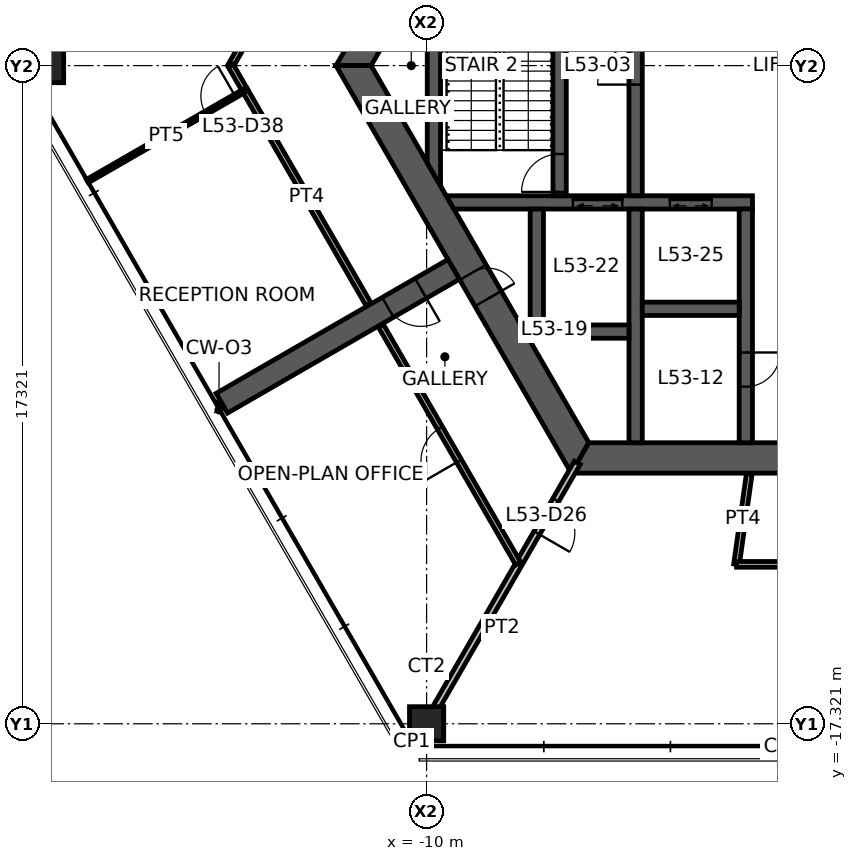
"""IFC4 building model, lengths in metres.
Left out: names, types, materials, properties, quantities, classifications, styles, units other than length and angle.
Written with IfcOpenShell. Run it as: python <this file> out.ifc"""

import sys

from ifc_helpers import new_model, si_unit, direction, frame, frame_2d, origin, origin_2d, place, context, subcontext, project, spatial, polyline, rectangle, hollow_rectangle, outline, extrude, element, fill, save


model = new_model("IFC4")
c1 = context("Model", 3, precision=1e-05, world=origin(), true_north=direction((0.0, 1.0)))
c2 = subcontext(c1, "Body", "Model", "MODEL_VIEW")
j1 = project(units=[si_unit("LENGTHUNIT", "METRE"), si_unit("PLANEANGLEUNIT", "RADIAN")], contexts=[c1])
p1 = place(None, origin())
s1 = spatial("IfcSite", under=j1, at=p1, CompositionType="ELEMENT")
p2 = place(p1, origin())
s2 = spatial("IfcBuilding", under=s1, at=p2, CompositionType="ELEMENT")
p3 = place(p2, frame((0.0, 0.0, 212.8)))
s3 = spatial("IfcBuildingStorey", under=s2, at=p3, CompositionType="ELEMENT", Elevation=212.8)
for number, where, z_axis, x_axis in (
    (1, (-20.0, 0.0, 0.0), (0.0, 0.0, 1.0), (1.0, 0.0, 0.0)),
    (2, (-10.0, -17.321, 0.0), (0.0, 0.0, 1.0), (1.0, 0.0, 0.0)),
):
    element("IfcColumn", number, at=place(p3, frame(where, z_axis=z_axis, x_axis=x_axis)), inside=s3, PredefinedType="COLUMN", context=c2, shape_type="SweptSolid", body=[
        extrude(hollow_rectangle(XDim=0.9, YDim=0.9, WallThickness=0.09, at=origin_2d()), origin(), (0.0, 0.0, 1.0), 3.9),
    ])
p4 = place(p3, frame((-5.961, 10.325, 0.0), z_axis=(0.0, 0.0, 1.0), x_axis=(-0.500004296715, -0.866022923061, 0.0)))
e3 = element("IfcWall", 3, at=p4, inside=s3, PredefinedType="SHEAR", context=c2, shape_type="SweptSolid", body=[
    extrude(outline(polyline([(-0.231, -0.4), (4.494, -0.4), (5.494, -0.4), (12.153, -0.4), (11.691, 0.4), (5.494, 0.4), (4.494, 0.4), (0.231, 0.4), (-0.231, -0.4)])), origin(), (0.0, 0.0, 1.0), 3.9),
])
p5 = place(p4, frame((4.494, 0.0, 0.0)))
e4 = element("IfcOpeningElement", 4, at=p5, cuts=e3, PredefinedType="OPENING", context=c2, shape_type="SweptSolid", body=[
    extrude(rectangle(XDim=1.0, YDim=2.1, at=frame_2d((0.5, 1.05))), frame((0.0, 0.41, 0.0), z_axis=(0.0, -1.0, 0.0), x_axis=(1.0, 0.0, 0.0)), (0.0, 0.0, 1.0), 0.82),
])
p6 = place(p3, frame((-11.922, 0.0, 0.0), z_axis=(0.0, 0.0, 1.0), x_axis=(0.500004296715, -0.866022923061, 0.0)))
e5 = element("IfcWall", 5, at=p6, inside=s3, PredefinedType="SHEAR", context=c2, shape_type="SweptSolid", body=[
    extrude(outline(polyline([(-0.231, -0.4), (6.281, -0.4), (7.081, -0.4), (12.153, -0.4), (11.691, 0.4), (7.081, 0.4), (6.281, 0.4), (0.231, 0.4), (-0.231, -0.4)])), origin(), (0.0, 0.0, 1.0), 3.9),
])
p7 = place(p6, frame((6.281, 0.0, 0.0)))
e6 = element("IfcOpeningElement", 6, at=p7, cuts=e5, PredefinedType="OPENING", context=c2, shape_type="SweptSolid", body=[
    extrude(rectangle(XDim=0.8, YDim=2.1, at=frame_2d((0.4, 1.05))), frame((0.0, 0.41, 0.0), z_axis=(0.0, -1.0, 0.0), x_axis=(1.0, 0.0, 0.0)), (0.0, 0.0, 1.0), 0.82),
])
p8 = place(p3, frame((-5.961, -10.325, 0.0), z_axis=(0.0, 0.0, 1.0), x_axis=(1.0, 0.0, 0.0)))
e7 = element("IfcWall", 7, at=p8, inside=s3, PredefinedType="SHEAR", context=c2, shape_type="SweptSolid", body=[
    extrude(outline(polyline([(-0.231, -0.4), (5.461, -0.4), (6.461, -0.4), (12.153, -0.4), (11.691, 0.4), (6.461, 0.4), (5.461, 0.4), (0.231, 0.4), (-0.231, -0.4)])), origin(), (0.0, 0.0, 1.0), 3.9),
])
p9 = place(p8, frame((5.461, 0.0, 0.0)))
e8 = element("IfcOpeningElement", 8, at=p9, cuts=e7, PredefinedType="OPENING", context=c2, shape_type="SweptSolid", body=[
    extrude(rectangle(XDim=1.0, YDim=2.1, at=frame_2d((0.5, 1.05))), frame((0.0, 0.41, 0.0), z_axis=(0.0, -1.0, 0.0), x_axis=(1.0, 0.0, 0.0)), (0.0, 0.0, 1.0), 0.82),
])
p10 = place(p3, frame((-9.288, -5.363, 0.0), z_axis=(0.0, 0.0, 1.0), x_axis=(-0.866027473358, -0.499996415376, 0.0)))
e9 = element("IfcWall", 9, at=p10, inside=s3, PredefinedType="SHEAR", context=c2, shape_type="SweptSolid", body=[
    extrude(rectangle(XDim=7.045, YDim=0.6, at=frame_2d((3.523, 0.0))), origin(), (0.0, 0.0, 1.0), 3.9),
])
p11 = place(p10, frame((1.0, 0.0, 0.0)))
e10 = element("IfcOpeningElement", 10, at=p11, cuts=e9, PredefinedType="OPENING", context=c2, shape_type="SweptSolid", body=[
    extrude(rectangle(XDim=1.0, YDim=2.1, at=frame_2d((0.5, 1.05))), frame((0.0, 0.31, 0.0), z_axis=(0.0, -1.0, 0.0), x_axis=(1.0, 0.0, 0.0)), (0.0, 0.0, 1.0), 0.62),
])
p12 = place(p3, frame((-9.382, -3.6, 0.0), z_axis=(0.0, 0.0, 1.0), x_axis=(1.0, 0.0, 0.0)))
e11 = element("IfcWall", 11, at=p12, inside=s3, PredefinedType="SHEAR", context=c2, shape_type="SweptSolid", body=[
    extrude(outline(polyline([(0.101, -0.175), (3.232, -0.175), (4.532, -0.175), (5.782, -0.175), (6.882, -0.175), (7.957, -0.175), (7.957, 0.175), (6.882, 0.175), (5.782, 0.175), (4.532, 0.175), (3.232, 0.175), (-0.101, 0.175), (0.101, -0.175)])), origin(), (0.0, 0.0, 1.0), 3.9),
])
p13 = place(p12, frame((5.782, 0.0, 0.0)))
e12 = element("IfcOpeningElement", 12, at=p13, cuts=e11, PredefinedType="OPENING", context=c2, shape_type="SweptSolid", body=[
    extrude(rectangle(XDim=1.1, YDim=2.1, at=frame_2d((0.55, 1.05))), frame((0.0, 0.185, 0.0), z_axis=(0.0, -1.0, 0.0), x_axis=(1.0, 0.0, 0.0)), (0.0, 0.0, 1.0), 0.37),
])
p14 = place(p12, frame((3.232, 0.0, 0.0)))
e13 = element("IfcOpeningElement", 13, at=p14, cuts=e11, PredefinedType="OPENING", context=c2, shape_type="SweptSolid", body=[
    extrude(rectangle(XDim=1.3, YDim=2.1, at=frame_2d((0.65, 1.05))), frame((0.0, 0.185, 0.0), z_axis=(0.0, -1.0, 0.0), x_axis=(1.0, 0.0, 0.0)), (0.0, 0.0, 1.0), 0.37),
])
p15 = place(p3, frame((-1.6, -3.775, 0.0), z_axis=(0.0, 0.0, 1.0), x_axis=(0.0, -1.0, 0.0)))
e14 = element("IfcWall", 14, at=p15, inside=s3, PredefinedType="SHEAR", context=c2, shape_type="SweptSolid", body=[
    extrude(rectangle(XDim=6.15, YDim=0.35, at=frame_2d((3.075, 0.0))), origin(), (0.0, 0.0, 1.0), 3.9),
])
p16 = place(p15, frame((3.775, 0.0, 0.0)))
e15 = element("IfcOpeningElement", 15, at=p16, cuts=e14, PredefinedType="OPENING", context=c2, shape_type="SweptSolid", body=[
    extrude(rectangle(XDim=0.9, YDim=2.1, at=frame_2d((0.45, 1.05))), frame((0.0, 0.185, 0.0), z_axis=(0.0, -1.0, 0.0), x_axis=(1.0, 0.0, 0.0)), (0.0, 0.0, 1.0), 0.37),
])
p17 = place(p3, frame((-4.5, -3.425, 0.0), z_axis=(0.0, 0.0, 1.0), x_axis=(0.0, 1.0, 0.0)))
e16 = element("IfcWall", 16, at=p17, inside=s3, PredefinedType="SHEAR", context=c2, shape_type="SweptSolid", body=[
    extrude(rectangle(XDim=6.85, YDim=0.35, at=frame_2d((3.425, 0.0))), origin(), (0.0, 0.0, 1.0), 3.9),
])
p18 = place(p17, frame((2.925, 0.0, 0.0)))
e17 = element("IfcOpeningElement", 17, at=p18, cuts=e16, PredefinedType="OPENING", context=c2, shape_type="SweptSolid", body=[
    extrude(rectangle(XDim=1.0, YDim=2.1, at=frame_2d((0.5, 1.05))), frame((0.0, 0.185, 0.0), z_axis=(0.0, -1.0, 0.0), x_axis=(1.0, 0.0, 0.0)), (0.0, 0.0, 1.0), 0.37),
])
p19 = place(p3, frame((-6.5, -3.425, 0.0), z_axis=(0.0, 0.0, 1.0), x_axis=(0.0, 1.0, 0.0)))
e18 = element("IfcWall", 18, at=p19, inside=s3, PredefinedType="SHEAR", context=c2, shape_type="SweptSolid", body=[
    extrude(rectangle(XDim=6.85, YDim=0.35, at=frame_2d((3.425, 0.0))), origin(), (0.0, 0.0, 1.0), 3.9),
])
p20 = place(p19, frame((0.1, 0.0, 0.0)))
e19 = element("IfcOpeningElement", 19, at=p20, cuts=e18, PredefinedType="OPENING", context=c2, shape_type="SweptSolid", body=[
    extrude(rectangle(XDim=1.0, YDim=2.1, at=frame_2d((0.5, 1.05))), frame((0.0, 0.185, 0.0), z_axis=(0.0, -1.0, 0.0), x_axis=(1.0, 0.0, 0.0)), (0.0, 0.0, 1.0), 0.37),
])
p21 = place(p3, frame((-4.5, -3.775, 0.0), z_axis=(0.0, 0.0, 1.0), x_axis=(0.0, -1.0, 0.0)))
e20 = element("IfcWall", 20, at=p21, inside=s3, PredefinedType="SHEAR", context=c2, shape_type="SweptSolid", body=[
    extrude(rectangle(XDim=6.15, YDim=0.35, at=frame_2d((3.075, 0.0))), origin(), (0.0, 0.0, 1.0), 3.9),
])
p22 = place(p3, frame((-4.325, -6.4, 0.0), z_axis=(0.0, 0.0, 1.0), x_axis=(1.0, 0.0, 0.0)))
e21 = element("IfcWall", 21, at=p22, inside=s3, PredefinedType="SHEAR", context=c2, shape_type="SweptSolid", body=[
    extrude(rectangle(XDim=2.55, YDim=0.35, at=frame_2d((1.275, 0.0))), origin(), (0.0, 0.0, 1.0), 3.9),
])
p23 = place(p3, frame((-7.275, -7.0, 0.0), z_axis=(0.0, 0.0, 1.0), x_axis=(1.0, 0.0, 0.0)))
e22 = element("IfcWall", 22, at=p23, inside=s3, PredefinedType="SHEAR", context=c2, shape_type="SweptSolid", body=[
    extrude(rectangle(XDim=2.6, YDim=0.35, at=frame_2d((1.3, 0.0))), origin(), (0.0, 0.0, 1.0), 3.9),
])
p24 = place(p3, frame((-7.1, -3.775, 0.0), z_axis=(0.0, 0.0, 1.0), x_axis=(0.0, -1.0, 0.0)))
e23 = element("IfcWall", 23, at=p24, inside=s3, PredefinedType="SHEAR", context=c2, shape_type="SweptSolid", body=[
    extrude(rectangle(XDim=3.05, YDim=0.35, at=frame_2d((1.525, 0.0))), origin(), (0.0, 0.0, 1.0), 3.9),
])
p25 = place(p3, frame((-9.808, -2.862, 0.0), z_axis=(0.0, 0.0, 1.0), x_axis=(0.0, 1.0, 0.0)))
e24 = element("IfcWall", 24, at=p25, inside=s3, PredefinedType="SHEAR", context=c2, shape_type="SweptSolid", body=[
    extrude(outline(polyline([(-0.303, -0.175), (6.028, -0.175), (5.421, 0.175), (0.303, 0.175), (-0.303, -0.175)])), origin(), (0.0, 0.0, 1.0), 3.9),
])
p26 = place(p3, frame((-6.035, -10.453, 0.0), z_axis=(0.0, 0.0, 1.0), x_axis=(-0.499989830942, -0.866031274813, 0.0)))
e25 = element("IfcWall", 25, at=p26, inside=s3, PredefinedType="PARTITIONING", context=c2, shape_type="SweptSolid", body=[
    extrude(rectangle(XDim=7.93, YDim=0.175, at=frame_2d((3.965, 0.0))), origin(), (0.0, 0.0, 1.0), 3.05),
])
p27 = place(p26, frame((1.13, 0.0, 0.0)))
e26 = element("IfcOpeningElement", 26, at=p27, cuts=e25, PredefinedType="OPENING", context=c2, shape_type="SweptSolid", body=[
    extrude(rectangle(XDim=1.0, YDim=2.1, at=frame_2d((0.5, 1.05))), frame((0.0, 0.098, 0.0), z_axis=(0.0, -1.0, 0.0), x_axis=(1.0, 0.0, 0.0)), (0.0, 0.0, 1.0), 0.195),
])
p28 = place(p3, frame((-11.527, -6.285, 0.0), z_axis=(0.0, 0.0, 1.0), x_axis=(-0.500003537243, 0.866023361547, 0.0)))
e27 = element("IfcWall", 27, at=p28, inside=s3, PredefinedType="PARTITIONING", context=c2, shape_type="SweptSolid", body=[
    extrude(rectangle(XDim=6.516, YDim=0.15, at=frame_2d((3.258, 0.0))), origin(), (0.0, 0.0, 1.0), 2.95),
])
p29 = place(p3, frame((-15.156, 0.0, 0.0), z_axis=(0.0, 0.0, 1.0), x_axis=(0.500006847747, 0.8660214502, 0.0)))
e28 = element("IfcWall", 28, at=p29, inside=s3, PredefinedType="PARTITIONING", context=c2, shape_type="SweptSolid", body=[
    extrude(rectangle(XDim=10.998, YDim=0.15, at=frame_2d((5.499, 0.0))), origin(), (0.0, 0.0, 1.0), 2.95),
])
p30 = place(p29, frame((4.999, 0.0, 0.0)))
e29 = element("IfcOpeningElement", 29, at=p30, cuts=e28, PredefinedType="OPENING", context=c2, shape_type="SweptSolid", body=[
    extrude(rectangle(XDim=1.0, YDim=2.1, at=frame_2d((0.5, 1.05))), frame((0.0, 0.085, 0.0), z_axis=(0.0, -1.0, 0.0), x_axis=(1.0, 0.0, 0.0)), (0.0, 0.0, 1.0), 0.17),
])
p31 = place(p3, frame((-14.78, -0.651, 0.0), z_axis=(0.0, 0.0, 1.0), x_axis=(-0.500088105676, 0.865974529972, 0.0)))
e30 = element("IfcWall", 30, at=p31, inside=s3, PredefinedType="PARTITIONING", context=c2, shape_type="SweptSolid", body=[
    extrude(rectangle(XDim=0.751, YDim=0.15, at=frame_2d((0.375, 0.0))), origin(), (0.0, 0.0, 1.0), 2.95),
])
p32 = place(p3, frame((-18.927, -3.04, 0.0), z_axis=(0.0, 0.0, 1.0), x_axis=(0.866495418212, 0.499185026035, 0.0)))
e31 = element("IfcWall", 31, at=p32, inside=s3, PredefinedType="PARTITIONING", context=c2, shape_type="SweptSolid", body=[
    extrude(rectangle(XDim=4.786, YDim=0.1, at=frame_2d((2.393, 0.0))), origin(), (0.0, 0.0, 1.0), 2.95),
])
p33 = place(p32, frame((3.585, 0.0, 0.0)))
e32 = element("IfcOpeningElement", 32, at=p33, cuts=e31, PredefinedType="OPENING", context=c2, shape_type="SweptSolid", body=[
    extrude(rectangle(XDim=0.9, YDim=2.1, at=frame_2d((0.45, 1.05))), frame((0.0, 0.06, 0.0), z_axis=(0.0, -1.0, 0.0), x_axis=(1.0, 0.0, 0.0)), (0.0, 0.0, 1.0), 0.12),
])
p34 = place(p3, frame((-7.589, -13.105, 0.0), z_axis=(0.0, 0.0, 1.0), x_axis=(-0.499986333712, 0.866033293876, 0.0)))
e33 = element("IfcWall", 33, at=p34, inside=s3, PredefinedType="PARTITIONING", context=c2, shape_type="SweptSolid", body=[
    extrude(rectangle(XDim=7.235, YDim=0.15, at=frame_2d((3.617, 0.0))), origin(), (0.0, 0.0, 1.0), 2.95),
])
p35 = place(p34, frame((3.117, 0.0, 0.0)))
e34 = element("IfcOpeningElement", 34, at=p35, cuts=e33, PredefinedType="OPENING", context=c2, shape_type="SweptSolid", body=[
    extrude(rectangle(XDim=1.0, YDim=2.1, at=frame_2d((0.5, 1.05))), frame((0.0, 0.085, 0.0), z_axis=(0.0, -1.0, 0.0), x_axis=(1.0, 0.0, 0.0)), (0.0, 0.0, 1.0), 0.17),
])
p36 = place(p3, frame((-1.844, -13.125, 0.0), z_axis=(0.0, 0.0, 1.0), x_axis=(0.139173892267, 0.99026795753, 0.0)))
e35 = element("IfcWall", 35, at=p36, inside=s3, PredefinedType="PARTITIONING", context=c2, shape_type="SweptSolid", body=[
    extrude(rectangle(XDim=2.403, YDim=0.15, at=frame_2d((1.202, 0.0))), origin(), (0.0, 0.0, 1.0), 2.95),
])
p37 = place(p3, frame((7.578, -13.125, 0.0), z_axis=(0.0, 0.0, 1.0), x_axis=(-1.0, 0.0, 0.0)))
e36 = element("IfcWall", 36, at=p37, inside=s3, PredefinedType="PARTITIONING", context=c2, shape_type="SweptSolid", body=[
    extrude(rectangle(XDim=9.422, YDim=0.15, at=frame_2d((4.711, 0.0))), origin(), (0.0, 0.0, 1.0), 2.95),
])
p38 = place(p37, frame((4.211, 0.0, 0.0)))
e37 = element("IfcOpeningElement", 37, at=p38, cuts=e36, PredefinedType="OPENING", context=c2, shape_type="SweptSolid", body=[
    extrude(rectangle(XDim=1.0, YDim=2.1, at=frame_2d((0.5, 1.05))), frame((0.0, 0.085, 0.0), z_axis=(0.0, -1.0, 0.0), x_axis=(1.0, 0.0, 0.0)), (0.0, 0.0, 1.0), 0.17),
])
p39 = place(p3, frame((-15.39, -8.885, 0.0), z_axis=(0.0, 0.0, 1.0), x_axis=(-0.866472036435, -0.499225610396, 0.0)))
e38 = element("IfcWall", 38, at=p39, inside=s3, PredefinedType="PARTITIONING", context=c2, shape_type="SweptSolid", body=[
    extrude(rectangle(XDim=0.085, YDim=0.175, at=frame_2d((0.042, 0.0))), origin(), (0.0, 0.0, 1.0), 3.9),
])
p40 = place(p7, origin())
e39 = element("IfcDoor", 39, at=p40, inside=s3, OperationType="SINGLE_SWING_RIGHT", PredefinedType="DOOR", context=c2, shape_type="SweptSolid", body=[
    extrude(rectangle(XDim=0.8, YDim=2.1, at=frame_2d((0.4, 1.05))), frame((0.0, 0.025, 0.0), z_axis=(0.0, -1.0, 0.0), x_axis=(1.0, 0.0, 0.0)), (0.0, 0.0, 1.0), 0.05),
])
fill(e6, e39)
p41 = place(p18, origin())
e40 = element("IfcDoor", 40, at=p41, inside=s3, OperationType="SINGLE_SWING_LEFT", PredefinedType="DOOR", context=c2, shape_type="SweptSolid", body=[
    extrude(rectangle(XDim=1.0, YDim=2.1, at=frame_2d((0.5, 1.05))), frame((0.0, 0.025, 0.0), z_axis=(0.0, -1.0, 0.0), x_axis=(1.0, 0.0, 0.0)), (0.0, 0.0, 1.0), 0.05),
])
fill(e17, e40)
p42 = place(p20, origin())
e41 = element("IfcDoor", 41, at=p42, inside=s3, OperationType="SINGLE_SWING_LEFT", PredefinedType="DOOR", context=c2, shape_type="SweptSolid", body=[
    extrude(rectangle(XDim=1.0, YDim=2.1, at=frame_2d((0.5, 1.05))), frame((0.0, 0.025, 0.0), z_axis=(0.0, -1.0, 0.0), x_axis=(1.0, 0.0, 0.0)), (0.0, 0.0, 1.0), 0.05),
])
fill(e19, e41)
p43 = place(p16, origin())
e42 = element("IfcDoor", 42, at=p43, inside=s3, OperationType="SINGLE_SWING_LEFT", PredefinedType="DOOR", context=c2, shape_type="SweptSolid", body=[
    extrude(rectangle(XDim=0.9, YDim=2.1, at=frame_2d((0.45, 1.05))), frame((0.0, 0.025, 0.0), z_axis=(0.0, -1.0, 0.0), x_axis=(1.0, 0.0, 0.0)), (0.0, 0.0, 1.0), 0.05),
])
fill(e15, e42)
p44 = place(p11, origin())
e43 = element("IfcDoor", 43, at=p44, inside=s3, OperationType="SINGLE_SWING_LEFT", PredefinedType="DOOR", context=c2, shape_type="SweptSolid", body=[
    extrude(rectangle(XDim=1.0, YDim=2.1, at=frame_2d((0.5, 1.05))), frame((0.0, 0.025, 0.0), z_axis=(0.0, -1.0, 0.0), x_axis=(1.0, 0.0, 0.0)), (0.0, 0.0, 1.0), 0.05),
])
fill(e10, e43)
p45 = place(p27, origin())
e44 = element("IfcDoor", 44, at=p45, inside=s3, OperationType="SINGLE_SWING_RIGHT", PredefinedType="DOOR", context=c2, shape_type="SweptSolid", body=[
    extrude(rectangle(XDim=1.0, YDim=2.1, at=frame_2d((0.5, 1.05))), frame((0.0, 0.025, 0.0), z_axis=(0.0, -1.0, 0.0), x_axis=(1.0, 0.0, 0.0)), (0.0, 0.0, 1.0), 0.05),
])
fill(e26, e44)
p46 = place(p33, origin())
e45 = element("IfcDoor", 45, at=p46, inside=s3, OperationType="SINGLE_SWING_RIGHT", PredefinedType="DOOR", context=c2, shape_type="SweptSolid", body=[
    extrude(rectangle(XDim=0.9, YDim=2.1, at=frame_2d((0.45, 1.05))), frame((0.0, 0.025, 0.0), z_axis=(0.0, -1.0, 0.0), x_axis=(1.0, 0.0, 0.0)), (0.0, 0.0, 1.0), 0.05),
])
fill(e32, e45)
p47 = place(p35, origin())
e46 = element("IfcDoor", 46, at=p47, inside=s3, OperationType="SINGLE_SWING_LEFT", PredefinedType="DOOR", context=c2, shape_type="SweptSolid", body=[
    extrude(rectangle(XDim=1.0, YDim=2.1, at=frame_2d((0.5, 1.05))), frame((0.0, 0.025, 0.0), z_axis=(0.0, -1.0, 0.0), x_axis=(1.0, 0.0, 0.0)), (0.0, 0.0, 1.0), 0.05),
])
fill(e34, e46)
p48 = place(p13, origin())
e47 = element("IfcDoor", 47, at=p48, inside=s3, OperationType="DOUBLE_DOOR_SLIDING", PredefinedType="DOOR", context=c2, shape_type="SweptSolid", body=[
    extrude(rectangle(XDim=1.1, YDim=2.1, at=frame_2d((0.55, 1.05))), frame((0.0, 0.025, 0.0), z_axis=(0.0, -1.0, 0.0), x_axis=(1.0, 0.0, 0.0)), (0.0, 0.0, 1.0), 0.05),
])
fill(e12, e47)
p49 = place(p14, origin())
e48 = element("IfcDoor", 48, at=p49, inside=s3, OperationType="DOUBLE_DOOR_SLIDING", PredefinedType="DOOR", context=c2, shape_type="SweptSolid", body=[
    extrude(rectangle(XDim=1.3, YDim=2.1, at=frame_2d((0.65, 1.05))), frame((0.0, 0.025, 0.0), z_axis=(0.0, -1.0, 0.0), x_axis=(1.0, 0.0, 0.0)), (0.0, 0.0, 1.0), 0.05),
])
fill(e13, e48)
save(model, sys.argv[1])
